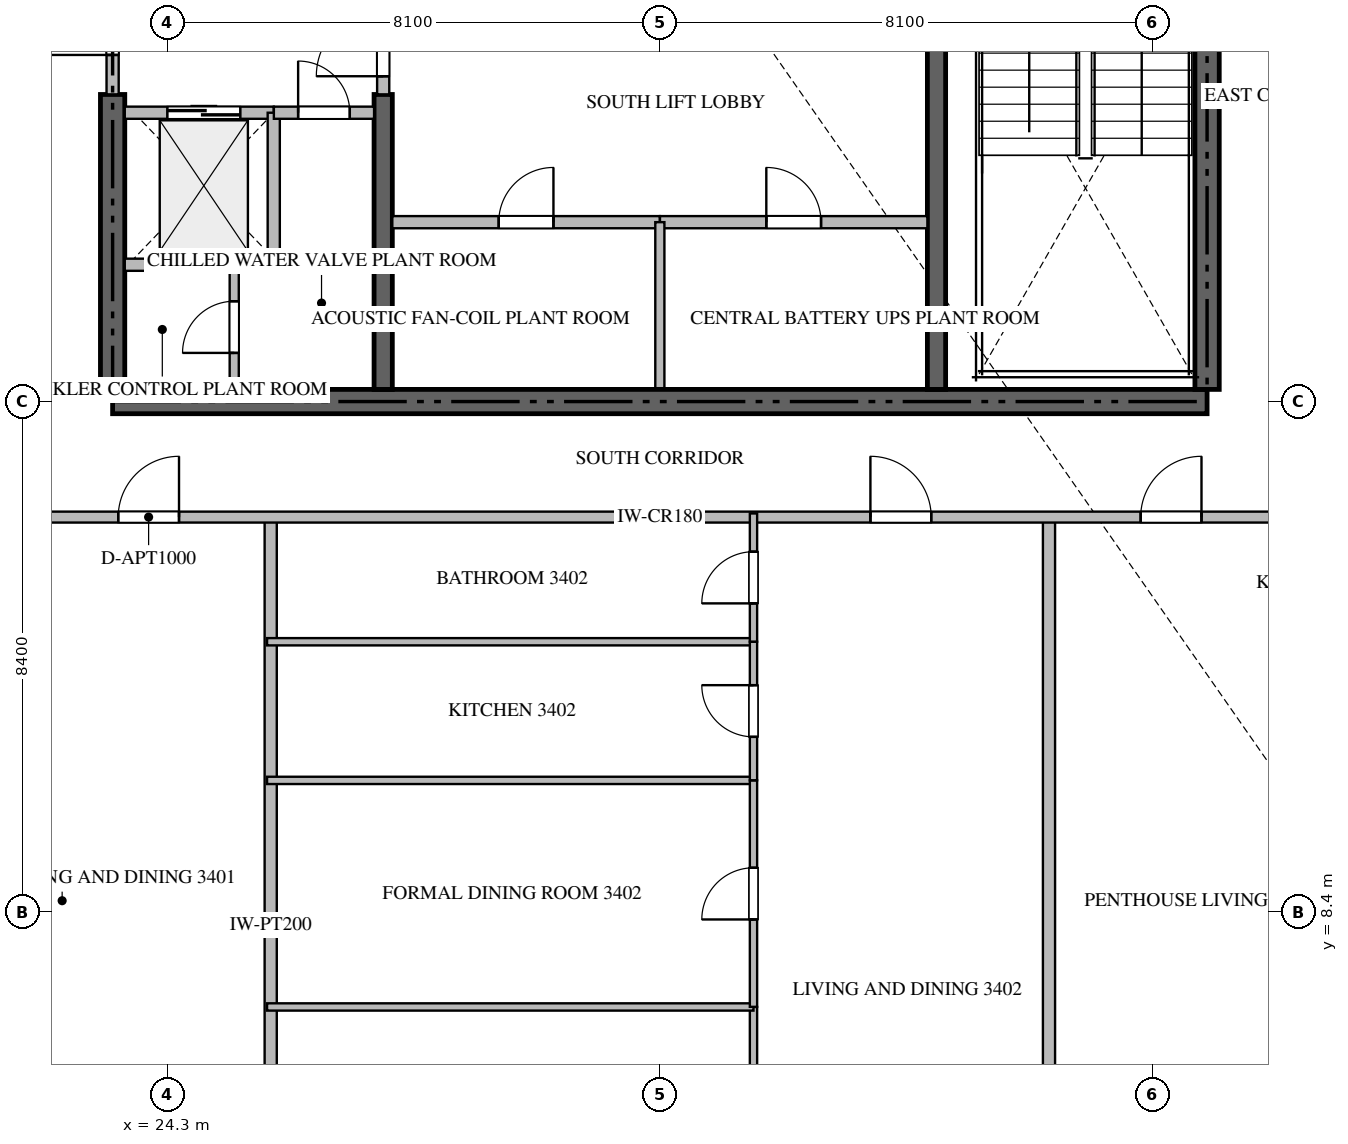
"""IFC4 building model, lengths in metres.
Left out: names, types, materials, properties, quantities, classifications, styles, units other than length and angle.
Written with IfcOpenShell. Run it as: python <this file> out.ifc"""

import sys

from ifc_helpers import new_model, si_unit, direction, frame, frame_2d, origin, place, context, subcontext, project, spatial, rectangle, extrude, source, transform, mapped, element, fill, save


model = new_model("IFC4")
c1 = context("Model", 3, precision=1e-05, world=origin(), true_north=direction((0.0, 1.0)))
c2 = subcontext(c1, "Body", "Model", "MODEL_VIEW")
j1 = project(units=[si_unit("LENGTHUNIT", "METRE"), si_unit("PLANEANGLEUNIT", "RADIAN")], contexts=[c1])
p1 = place(None, origin())
s1 = spatial("IfcSite", under=j1, at=p1, CompositionType="ELEMENT")
p2 = place(p1, origin())
s2 = spatial("IfcBuilding", under=s1, at=p2, CompositionType="ELEMENT")
p3 = place(p2, frame((0.0, 0.0, 138.9)))
s3 = spatial("IfcBuildingStorey", under=s2, at=p3, CompositionType="ELEMENT", Elevation=138.9)
p4 = place(p3, frame((23.4, 16.8, -0.26), z_axis=(0.0, 0.0, 1.0), x_axis=(1.0, 0.0, 0.0)))
e1 = element("IfcWall", 1, at=p4, inside=s3, PredefinedType="SHEAR", context=c2, shape_type="SweptSolid", body=[
    extrude(rectangle(XDim=18.0, YDim=0.4, at=frame_2d((9.0, 0.0))), origin(), (0.0, 0.0, 1.0), 3.748),
])
p5 = place(p3, frame((23.4, 17.0, -0.26), z_axis=(0.0, 0.0, 1.0), x_axis=(0.0, 1.0, 0.0)))
e2 = element("IfcWall", 2, at=p5, inside=s3, PredefinedType="SHEAR", context=c2, shape_type="SweptSolid", body=[
    extrude(rectangle(XDim=4.85, YDim=0.4, at=frame_2d((2.425, 0.0))), origin(), (0.0, 0.0, 1.0), 3.748),
])
p6 = place(p3, frame((41.4, 17.0, -0.26), z_axis=(0.0, 0.0, 1.0), x_axis=(0.0, 1.0, 0.0)))
e3 = element("IfcWall", 3, at=p6, inside=s3, PredefinedType="SHEAR", context=c2, shape_type="SweptSolid", body=[
    extrude(rectangle(XDim=8.35, YDim=0.4, at=frame_2d((4.175, 0.0))), origin(), (0.0, 0.0, 1.0), 3.748),
])
p7 = place(p3, frame((27.85, 17.0, -0.26), z_axis=(0.0, 0.0, 1.0), x_axis=(0.0, 1.0, 0.0)))
e4 = element("IfcWall", 4, at=p7, inside=s3, PredefinedType="SHEAR", context=c2, shape_type="SweptSolid", body=[
    extrude(rectangle(XDim=4.85, YDim=0.3, at=frame_2d((2.425, 0.0))), origin(), (0.0, 0.0, 1.0), 3.748),
])
p8 = place(p3, frame((36.95, 17.0, -0.26), z_axis=(0.0, 0.0, 1.0), x_axis=(0.0, 1.0, 0.0)))
e5 = element("IfcWall", 5, at=p8, inside=s3, PredefinedType="SHEAR", context=c2, shape_type="SweptSolid", body=[
    extrude(rectangle(XDim=8.35, YDim=0.3, at=frame_2d((4.175, 0.0))), origin(), (0.0, 0.0, 1.0), 3.748),
])
p9 = place(p3, frame((23.6, 21.55, 0.0), z_axis=(0.0, 0.0, 1.0), x_axis=(1.0, 0.0, 0.0)))
e6 = element("IfcWall", 6, at=p9, inside=s3, PredefinedType="STANDARD", context=c2, shape_type="SweptSolid", body=[
    extrude(rectangle(XDim=2.45, YDim=0.2, at=frame_2d((1.225, 0.0))), origin(), (0.0, 0.0, 1.0), 3.49),
])
p10 = place(p9, frame((0.7, 0.0, 0.0)))
e7 = element("IfcOpeningElement", 7, at=p10, cuts=e6, PredefinedType="OPENING", context=c2, shape_type="SweptSolid", body=[
    extrude(rectangle(XDim=1.2, YDim=2.2, at=frame_2d((0.6, 1.1))), frame((0.0, 0.11, 0.0), z_axis=(0.0, -1.0, 0.0), x_axis=(1.0, 0.0, 0.0)), (0.0, 0.0, 1.0), 0.22),
])
p11 = place(p3, frame((26.05, 19.05, 0.0), z_axis=(0.0, 0.0, 1.0), x_axis=(0.0, 1.0, 0.0)))
e8 = element("IfcWall", 8, at=p11, inside=s3, PredefinedType="STANDARD", context=c2, shape_type="SweptSolid", body=[
    extrude(rectangle(XDim=2.5, YDim=0.2, at=frame_2d((1.25, 0.0))), origin(), (0.0, 0.0, 1.0), 3.49),
])
p12 = place(p3, frame((23.6, 19.05, 0.0), z_axis=(0.0, 0.0, 1.0), x_axis=(1.0, 0.0, 0.0)))
e9 = element("IfcWall", 9, at=p12, inside=s3, PredefinedType="STANDARD", context=c2, shape_type="SweptSolid", body=[
    extrude(rectangle(XDim=2.45, YDim=0.2, at=frame_2d((1.225, 0.0))), origin(), (0.0, 0.0, 1.0), 3.49),
])
p13 = place(p3, frame((26.052, 21.55, 0.0), z_axis=(0.0, 0.0, 1.0), x_axis=(1.0, 0.0, 0.0)))
e10 = element("IfcWall", 10, at=p13, inside=s3, PredefinedType="STANDARD", context=c2, shape_type="SweptSolid", body=[
    extrude(rectangle(XDim=1.648, YDim=0.2, at=frame_2d((0.824, 0.0))), origin(), (0.0, 0.0, 1.0), 3.49),
])
p14 = place(p13, frame((0.399, 0.0, 0.0)))
e11 = element("IfcOpeningElement", 11, at=p14, cuts=e10, PredefinedType="OPENING", context=c2, shape_type="SweptSolid", body=[
    extrude(rectangle(XDim=0.85, YDim=2.1, at=frame_2d((0.425, 1.05))), frame((0.0, 0.11, 0.0), z_axis=(0.0, -1.0, 0.0), x_axis=(1.0, 0.0, 0.0)), (0.0, 0.0, 1.0), 0.22),
])
p15 = place(p3, frame((23.4, 21.852, 0.0), z_axis=(0.0, 0.0, 1.0), x_axis=(0.0, 1.0, 0.0)))
e12 = element("IfcWall", 12, at=p15, inside=s3, PredefinedType="STANDARD", context=c2, shape_type="SweptSolid", body=[
    extrude(rectangle(XDim=2.396, YDim=0.2, at=frame_2d((1.198, 0.0))), origin(), (0.0, 0.0, 1.0), 3.49),
])
p16 = place(p15, frame((0.648, 0.0, 0.0)))
e13 = element("IfcOpeningElement", 13, at=p16, cuts=e12, PredefinedType="OPENING", context=c2, shape_type="SweptSolid", body=[
    extrude(rectangle(XDim=1.1, YDim=2.15, at=frame_2d((0.55, 1.075))), frame((0.0, 0.11, 0.0), z_axis=(0.0, -1.0, 0.0), x_axis=(1.0, 0.0, 0.0)), (0.0, 0.0, 1.0), 0.22),
])
p17 = place(p3, frame((27.85, 21.852, 0.0), z_axis=(0.0, 0.0, 1.0), x_axis=(0.0, 1.0, 0.0)))
e14 = element("IfcWall", 14, at=p17, inside=s3, PredefinedType="STANDARD", context=c2, shape_type="SweptSolid", body=[
    extrude(rectangle(XDim=1.696, YDim=0.2, at=frame_2d((0.848, 0.0))), origin(), (0.0, 0.0, 1.0), 3.49),
])
p18 = place(p17, frame((0.298, 0.0, 0.0)))
e15 = element("IfcOpeningElement", 15, at=p18, cuts=e14, PredefinedType="OPENING", context=c2, shape_type="SweptSolid", body=[
    extrude(rectangle(XDim=1.1, YDim=2.15, at=frame_2d((0.55, 1.075))), frame((0.0, 0.11, 0.0), z_axis=(0.0, -1.0, 0.0), x_axis=(1.0, 0.0, 0.0)), (0.0, 0.0, 1.0), 0.22),
])
p19 = place(p3, frame((25.4, 17.0, 0.0), z_axis=(0.0, 0.0, 1.0), x_axis=(0.0, 1.0, 0.0)))
e16 = element("IfcWall", 16, at=p19, inside=s3, PredefinedType="PARTITIONING", context=c2, shape_type="SweptSolid", body=[
    extrude(rectangle(XDim=2.05, YDim=0.15, at=frame_2d((1.025, 0.0))), origin(), (0.0, 0.0, 1.0), 3.49),
])
p20 = place(p19, frame((0.6, 0.0, 0.0)))
e17 = element("IfcOpeningElement", 17, at=p20, cuts=e16, PredefinedType="OPENING", context=c2, shape_type="SweptSolid", body=[
    extrude(rectangle(XDim=0.85, YDim=2.1, at=frame_2d((0.425, 1.05))), frame((0.0, 0.085, 0.0), z_axis=(0.0, -1.0, 0.0), x_axis=(1.0, 0.0, 0.0)), (0.0, 0.0, 1.0), 0.17),
])
p21 = place(p3, frame((28.0, 19.75, 0.0), z_axis=(0.0, 0.0, 1.0), x_axis=(1.0, 0.0, 0.0)))
e18 = element("IfcWall", 18, at=p21, inside=s3, PredefinedType="STANDARD", context=c2, shape_type="SweptSolid", body=[
    extrude(rectangle(XDim=4.4, YDim=0.2, at=frame_2d((2.2, 0.0))), origin(), (0.0, 0.0, 1.0), 3.49),
])
p22 = place(p21, frame((1.75, 0.0, 0.0)))
e19 = element("IfcOpeningElement", 19, at=p22, cuts=e18, PredefinedType="OPENING", context=c2, shape_type="SweptSolid", body=[
    extrude(rectangle(XDim=0.9, YDim=2.1, at=frame_2d((0.45, 1.05))), frame((0.0, 0.11, 0.0), z_axis=(0.0, -1.0, 0.0), x_axis=(1.0, 0.0, 0.0)), (0.0, 0.0, 1.0), 0.22),
])
p23 = place(p3, frame((32.402, 19.75, 0.0), z_axis=(0.0, 0.0, 1.0), x_axis=(1.0, 0.0, 0.0)))
e20 = element("IfcWall", 20, at=p23, inside=s3, PredefinedType="STANDARD", context=c2, shape_type="SweptSolid", body=[
    extrude(rectangle(XDim=4.398, YDim=0.2, at=frame_2d((2.199, 0.0))), origin(), (0.0, 0.0, 1.0), 3.49),
])
p24 = place(p23, frame((1.749, 0.0, 0.0)))
e21 = element("IfcOpeningElement", 21, at=p24, cuts=e20, PredefinedType="OPENING", context=c2, shape_type="SweptSolid", body=[
    extrude(rectangle(XDim=0.9, YDim=2.1, at=frame_2d((0.45, 1.05))), frame((0.0, 0.11, 0.0), z_axis=(0.0, -1.0, 0.0), x_axis=(1.0, 0.0, 0.0)), (0.0, 0.0, 1.0), 0.22),
])
p25 = place(p3, frame((32.4, 17.02, 0.0), z_axis=(0.0, 0.0, 1.0), x_axis=(0.0, 1.0, 0.0)))
e22 = element("IfcWall", 22, at=p25, inside=s3, PredefinedType="PARTITIONING", context=c2, shape_type="SweptSolid", body=[
    extrude(rectangle(XDim=2.73, YDim=0.15, at=frame_2d((1.365, 0.0))), origin(), (0.0, 0.0, 1.0), 3.49),
])
for number, where, z_axis, x_axis in (
    (23, (26.0, 1.482, 0.0), (0.0, 0.0, 1.0), (0.0, 1.0, 0.0)),
    (24, (38.8, 1.482, 0.0), (0.0, 0.0, 1.0), (0.0, 1.0, 0.0)),
):
    element("IfcWall", number, at=place(p3, frame(where, z_axis=z_axis, x_axis=x_axis)), inside=s3, PredefinedType="PARTITIONING", context=c2, shape_type="SweptSolid", body=[
        extrude(rectangle(XDim=13.418, YDim=0.2, at=frame_2d((6.709, 0.0))), origin(), (0.0, 0.0, 1.0), 3.49),
    ])
p26 = place(p3, frame((20.952, 14.9, 0.0), z_axis=(0.0, 0.0, 1.0), x_axis=(1.0, 0.0, 0.0)))
e25 = element("IfcWall", 25, at=p26, inside=s3, PredefinedType="PARTITIONING", context=c2, shape_type="SweptSolid", body=[
    extrude(rectangle(XDim=22.896, YDim=0.18, at=frame_2d((11.448, 0.0))), origin(), (0.0, 0.0, 1.0), 3.49),
])
p27 = place(p26, frame((2.54, 0.0, 0.0)))
e26 = element("IfcOpeningElement", 26, at=p27, cuts=e25, PredefinedType="OPENING", context=c2, shape_type="SweptSolid", body=[
    extrude(rectangle(XDim=1.0, YDim=2.15, at=frame_2d((0.5, 1.075))), frame((0.0, 0.1, 0.0), z_axis=(0.0, -1.0, 0.0), x_axis=(1.0, 0.0, 0.0)), (0.0, 0.0, 1.0), 0.2),
])
p28 = place(p26, frame((14.911, 0.0, 0.0)))
e27 = element("IfcOpeningElement", 27, at=p28, cuts=e25, PredefinedType="OPENING", context=c2, shape_type="SweptSolid", body=[
    extrude(rectangle(XDim=1.0, YDim=2.15, at=frame_2d((0.5, 1.075))), frame((0.0, 0.1, 0.0), z_axis=(0.0, -1.0, 0.0), x_axis=(1.0, 0.0, 0.0)), (0.0, 0.0, 1.0), 0.2),
])
p29 = place(p26, frame((19.356, 0.0, 0.0)))
e28 = element("IfcOpeningElement", 28, at=p29, cuts=e25, PredefinedType="OPENING", context=c2, shape_type="SweptSolid", body=[
    extrude(rectangle(XDim=1.0, YDim=2.15, at=frame_2d((0.5, 1.075))), frame((0.0, 0.1, 0.0), z_axis=(0.0, -1.0, 0.0), x_axis=(1.0, 0.0, 0.0)), (0.0, 0.0, 1.0), 0.2),
])
p30 = place(p3, frame((33.94, 1.495, 0.0), z_axis=(0.0, 0.0, 1.0), x_axis=(0.0, 1.0, 0.0)))
e29 = element("IfcWall", 29, at=p30, inside=s3, PredefinedType="PARTITIONING", context=c2, shape_type="SweptSolid", body=[
    extrude(rectangle(XDim=5.349, YDim=0.12, at=frame_2d((2.674, 0.0))), origin(), (0.0, 0.0, 1.0), 3.49),
])
p31 = place(p30, frame((2.447, 0.0, 0.0)))
e30 = element("IfcOpeningElement", 30, at=p31, cuts=e29, PredefinedType="OPENING", context=c2, shape_type="SweptSolid", body=[
    extrude(rectangle(XDim=0.9, YDim=2.1, at=frame_2d((0.45, 1.05))), frame((0.0, 0.07, 0.0), z_axis=(0.0, -1.0, 0.0), x_axis=(1.0, 0.0, 0.0)), (0.0, 0.0, 1.0), 0.14),
])
for number, where, z_axis, x_axis in (
    (31, (25.94, 6.844, 0.0), (0.0, 0.0, 1.0), (1.0, 0.0, 0.0)),
    (32, (25.94, 10.57, 0.0), (0.0, 0.0, 1.0), (1.0, 0.0, 0.0)),
    (33, (25.94, 12.85, 0.0), (0.0, 0.0, 1.0), (1.0, 0.0, 0.0)),
):
    element("IfcWall", number, at=place(p3, frame(where, z_axis=z_axis, x_axis=x_axis)), inside=s3, PredefinedType="PARTITIONING", context=c2, shape_type="SweptSolid", body=[
        extrude(rectangle(XDim=8.0, YDim=0.12, at=frame_2d((4.0, 0.0))), origin(), (0.0, 0.0, 1.0), 3.49),
    ])
p32 = place(p3, frame((33.94, 6.846, 0.0), z_axis=(0.0, 0.0, 1.0), x_axis=(0.0, 1.0, 0.0)))
e34 = element("IfcWall", 34, at=p32, inside=s3, PredefinedType="PARTITIONING", context=c2, shape_type="SweptSolid", body=[
    extrude(rectangle(XDim=3.724, YDim=0.12, at=frame_2d((1.862, 0.0))), origin(), (0.0, 0.0, 1.0), 3.49),
])
p33 = place(p32, frame((1.437, 0.0, 0.0)))
e35 = element("IfcOpeningElement", 35, at=p33, cuts=e34, PredefinedType="OPENING", context=c2, shape_type="SweptSolid", body=[
    extrude(rectangle(XDim=0.85, YDim=2.1, at=frame_2d((0.425, 1.05))), frame((0.0, 0.07, 0.0), z_axis=(0.0, -1.0, 0.0), x_axis=(1.0, 0.0, 0.0)), (0.0, 0.0, 1.0), 0.14),
])
p34 = place(p3, frame((33.94, 10.572, 0.0), z_axis=(0.0, 0.0, 1.0), x_axis=(0.0, 1.0, 0.0)))
e36 = element("IfcWall", 36, at=p34, inside=s3, PredefinedType="PARTITIONING", context=c2, shape_type="SweptSolid", body=[
    extrude(rectangle(XDim=2.278, YDim=0.12, at=frame_2d((1.139, 0.0))), origin(), (0.0, 0.0, 1.0), 3.49),
])
p35 = place(p34, frame((0.714, 0.0, 0.0)))
e37 = element("IfcOpeningElement", 37, at=p35, cuts=e36, PredefinedType="OPENING", context=c2, shape_type="SweptSolid", body=[
    extrude(rectangle(XDim=0.85, YDim=2.1, at=frame_2d((0.425, 1.05))), frame((0.0, 0.07, 0.0), z_axis=(0.0, -1.0, 0.0), x_axis=(1.0, 0.0, 0.0)), (0.0, 0.0, 1.0), 0.14),
])
p36 = place(p3, frame((33.94, 12.852, 0.0), z_axis=(0.0, 0.0, 1.0), x_axis=(0.0, 1.0, 0.0)))
e38 = element("IfcWall", 38, at=p36, inside=s3, PredefinedType="PARTITIONING", context=c2, shape_type="SweptSolid", body=[
    extrude(rectangle(XDim=2.108, YDim=0.12, at=frame_2d((1.054, 0.0))), origin(), (0.0, 0.0, 1.0), 3.49),
])
p37 = place(p36, frame((0.629, 0.0, 0.0)))
e39 = element("IfcOpeningElement", 39, at=p37, cuts=e38, PredefinedType="OPENING", context=c2, shape_type="SweptSolid", body=[
    extrude(rectangle(XDim=0.85, YDim=2.1, at=frame_2d((0.425, 1.05))), frame((0.0, 0.07, 0.0), z_axis=(0.0, -1.0, 0.0), x_axis=(1.0, 0.0, 0.0)), (0.0, 0.0, 1.0), 0.14),
])
m1 = source(origin(), c2, "Body", "SweptSolid", [
    extrude(rectangle(XDim=1.2, YDim=2.2, at=frame_2d((0.6, 1.1))), frame((0.0, 0.025, 0.0), z_axis=(0.0, -1.0, 0.0), x_axis=(1.0, 0.0, 0.0)), (0.0, 0.0, 1.0), 0.05),
])
p38 = place(p10, origin())
e40 = element("IfcDoor", 40, at=p38, inside=s3, OperationType="DOUBLE_DOOR_SLIDING", PredefinedType="DOOR", context=c2, shape_type="MappedRepresentation", body=[
    mapped(m1, transform((0.0, 0.0, 0.0), scale=1.0)),
])
fill(e7, e40)
m2 = source(origin(), c2, "Body", "SweptSolid", [
    extrude(rectangle(XDim=0.85, YDim=2.1, at=frame_2d((0.425, 1.05))), frame((0.0, 0.025, 0.0), z_axis=(0.0, -1.0, 0.0), x_axis=(1.0, 0.0, 0.0)), (0.0, 0.0, 1.0), 0.05),
])
p39 = place(p14, origin())
e41 = element("IfcDoor", 41, at=p39, inside=s3, OperationType="SINGLE_SWING_LEFT", PredefinedType="DOOR", context=c2, shape_type="MappedRepresentation", body=[
    mapped(m2, transform((0.0, 0.0, 0.0), scale=1.0)),
])
fill(e11, e41)
m3 = source(origin(), c2, "Body", "SweptSolid", [
    extrude(rectangle(XDim=1.1, YDim=2.15, at=frame_2d((0.55, 1.075))), frame((0.0, 0.025, 0.0), z_axis=(0.0, -1.0, 0.0), x_axis=(1.0, 0.0, 0.0)), (0.0, 0.0, 1.0), 0.05),
])
p40 = place(p16, origin())
e42 = element("IfcDoor", 42, at=p40, inside=s3, OperationType="SINGLE_SWING_LEFT", PredefinedType="DOOR", context=c2, shape_type="MappedRepresentation", body=[
    mapped(m3, transform((0.0, 0.0, 0.0), scale=1.0)),
])
fill(e13, e42)
p41 = place(p18, origin())
e43 = element("IfcDoor", 43, at=p41, inside=s3, OperationType="SINGLE_SWING_LEFT", PredefinedType="DOOR", context=c2, shape_type="MappedRepresentation", body=[
    mapped(m3, transform((0.0, 0.0, 0.0), scale=1.0)),
])
fill(e15, e43)
p42 = place(p20, origin())
e44 = element("IfcDoor", 44, at=p42, inside=s3, OperationType="SINGLE_SWING_LEFT", PredefinedType="DOOR", context=c2, shape_type="MappedRepresentation", body=[
    mapped(m2, transform((0.0, 0.0, 0.0), scale=1.0)),
])
fill(e17, e44)
m4 = source(origin(), c2, "Body", "SweptSolid", [
    extrude(rectangle(XDim=0.9, YDim=2.1, at=frame_2d((0.45, 1.05))), frame((0.0, 0.025, 0.0), z_axis=(0.0, -1.0, 0.0), x_axis=(1.0, 0.0, 0.0)), (0.0, 0.0, 1.0), 0.05),
])
p43 = place(p22, origin())
e45 = element("IfcDoor", 45, at=p43, inside=s3, OperationType="SINGLE_SWING_RIGHT", PredefinedType="DOOR", context=c2, shape_type="MappedRepresentation", body=[
    mapped(m4, transform((0.0, 0.0, 0.0), scale=1.0)),
])
fill(e19, e45)
p44 = place(p24, origin())
e46 = element("IfcDoor", 46, at=p44, inside=s3, OperationType="SINGLE_SWING_LEFT", PredefinedType="DOOR", context=c2, shape_type="MappedRepresentation", body=[
    mapped(m4, transform((0.0, 0.0, 0.0), scale=1.0)),
])
fill(e21, e46)
m5 = source(origin(), c2, "Body", "SweptSolid", [
    extrude(rectangle(XDim=1.0, YDim=2.15, at=frame_2d((0.5, 1.075))), frame((0.0, 0.025, 0.0), z_axis=(0.0, -1.0, 0.0), x_axis=(1.0, 0.0, 0.0)), (0.0, 0.0, 1.0), 0.05),
])
p45 = place(p27, origin())
e47 = element("IfcDoor", 47, at=p45, inside=s3, OperationType="SINGLE_SWING_RIGHT", PredefinedType="DOOR", context=c2, shape_type="MappedRepresentation", body=[
    mapped(m5, transform((0.0, 0.0, 0.0), scale=1.0)),
])
fill(e26, e47)
p46 = place(p28, origin())
e48 = element("IfcDoor", 48, at=p46, inside=s3, OperationType="SINGLE_SWING_LEFT", PredefinedType="DOOR", context=c2, shape_type="MappedRepresentation", body=[
    mapped(m5, transform((0.0, 0.0, 0.0), scale=1.0)),
])
fill(e27, e48)
p47 = place(p29, origin())
e49 = element("IfcDoor", 49, at=p47, inside=s3, OperationType="SINGLE_SWING_RIGHT", PredefinedType="DOOR", context=c2, shape_type="MappedRepresentation", body=[
    mapped(m5, transform((0.0, 0.0, 0.0), scale=1.0)),
])
fill(e28, e49)
p48 = place(p33, origin())
e50 = element("IfcDoor", 50, at=p48, inside=s3, OperationType="SINGLE_SWING_LEFT", PredefinedType="DOOR", context=c2, shape_type="MappedRepresentation", body=[
    mapped(m2, transform((0.0, 0.0, 0.0), scale=1.0)),
])
fill(e35, e50)
p49 = place(p35, origin())
e51 = element("IfcDoor", 51, at=p49, inside=s3, OperationType="SINGLE_SWING_RIGHT", PredefinedType="DOOR", context=c2, shape_type="MappedRepresentation", body=[
    mapped(m2, transform((0.0, 0.0, 0.0), scale=1.0)),
])
fill(e37, e51)
p50 = place(p37, origin())
e52 = element("IfcDoor", 52, at=p50, inside=s3, OperationType="SINGLE_SWING_LEFT", PredefinedType="DOOR", context=c2, shape_type="MappedRepresentation", body=[
    mapped(m2, transform((0.0, 0.0, 0.0), scale=1.0)),
])
fill(e39, e52)
save(model, sys.argv[1])
